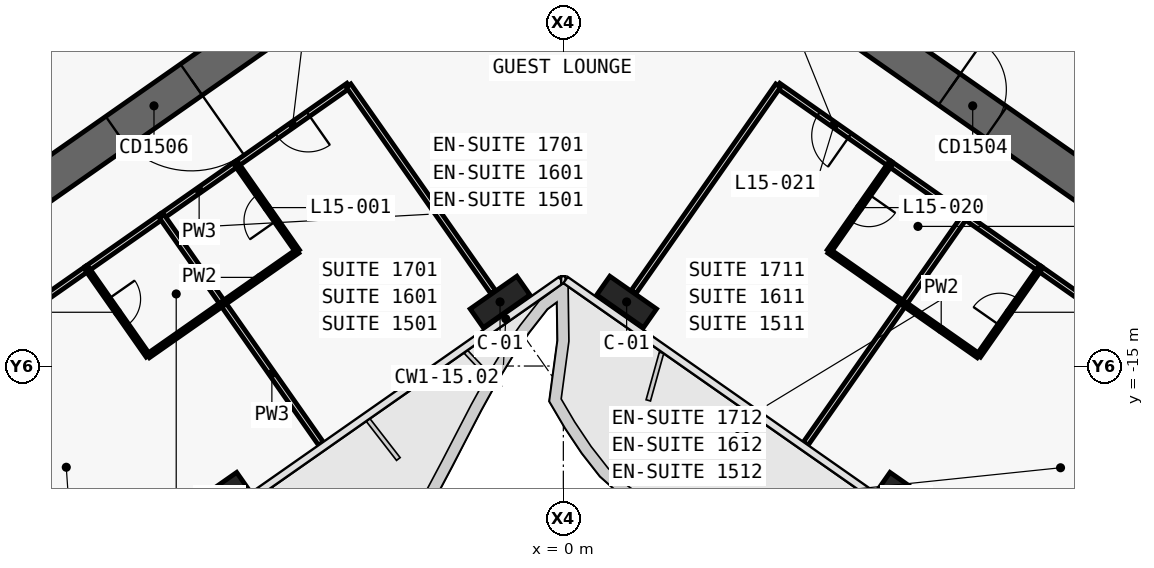
"""IFC4 building model, lengths in metres.
Left out: names, types, materials, properties, quantities, classifications, styles, units other than length and angle.
Written with IfcOpenShell. Run it as: python <this file> out.ifc"""

import sys

from ifc_helpers import new_model, si_unit, direction, frame, frame_2d, origin, origin_2d, place, context, subcontext, project, spatial, polyline, rectangle, outline, extrude, element, fill, save


model = new_model("IFC4")
c1 = context("Model", 3, precision=1e-05, world=origin(), true_north=direction((0.0, 1.0)))
c2 = subcontext(c1, "Body", "Model", "MODEL_VIEW")
j1 = project(units=[si_unit("LENGTHUNIT", "METRE"), si_unit("PLANEANGLEUNIT", "RADIAN")], contexts=[c1])
p1 = place(None, origin())
s1 = spatial("IfcSite", under=j1, at=p1, CompositionType="ELEMENT")
p2 = place(p1, origin())
s2 = spatial("IfcBuilding", under=s1, at=p2, CompositionType="ELEMENT")
p3 = place(p2, frame((0.0, 0.0, 79.7)))
s3 = spatial("IfcBuildingStorey", under=s2, at=p3, CompositionType="ELEMENT", Elevation=79.7)
p4 = place(p3, frame((0.037, 11.867, 0.0), z_axis=(0.0, 0.0, 1.0), x_axis=(-0.819155306259, -0.573571777746, 0.0)))
e1 = element("IfcWall", 1, at=p4, inside=s3, PredefinedType="SHEAR", context=c2, shape_type="SweptSolid", body=[
    extrude(outline(polyline([(33.837, 0.5), (0.7, 0.5), (0.0, -0.5), (33.837, -0.5), (33.837, 0.5)])), origin(), (0.0, 0.0, 1.0), 3.6),
])
p5 = place(p3, frame((0.037, -0.585, 0.0), z_axis=(0.0, 0.0, 1.0), x_axis=(-0.819157152511, -0.573569140985, 0.0)))
e2 = element("IfcWall", 2, at=p5, inside=s3, PredefinedType="SHEAR", context=c2, shape_type="SweptSolid", body=[
    extrude(outline(polyline([(26.695, 0.5), (0.7, 0.5), (0.0, -0.5), (26.695, -0.5), (26.695, 0.5)])), origin(), (0.0, 0.0, 1.0), 3.6),
])
p6 = place(p5, frame((2.995, 0.0, 0.0)))
e3 = element("IfcOpeningElement", 3, at=p6, cuts=e2, PredefinedType="OPENING", context=c2, shape_type="SweptSolid", body=[
    extrude(rectangle(XDim=2.4, YDim=2.1, at=frame_2d((1.2, 1.05))), frame((0.0, 0.51, 0.0), z_axis=(0.0, -1.0, 0.0), x_axis=(1.0, 0.0, 0.0)), (0.0, 0.0, 1.0), 1.02),
])
p7 = place(p5, frame((11.995, 0.0, 0.0)))
e4 = element("IfcOpeningElement", 4, at=p7, cuts=e2, PredefinedType="OPENING", context=c2, shape_type="SweptSolid", body=[
    extrude(rectangle(XDim=2.4, YDim=2.1, at=frame_2d((1.2, 1.05))), frame((0.0, 0.51, 0.0), z_axis=(0.0, -1.0, 0.0), x_axis=(1.0, 0.0, 0.0)), (0.0, 0.0, 1.0), 1.02),
])
p8 = place(p3, frame((-2.638, 3.768, 0.0), z_axis=(0.0, 0.0, 1.0), x_axis=(-0.819148977158, -0.573580816643, 0.0)))
e5 = element("IfcWall", 5, at=p8, inside=s3, PredefinedType="SHEAR", context=c2, shape_type="SweptSolid", body=[
    extrude(outline(polyline([(26.0, 0.25), (0.0, 0.25), (0.0, -0.25), (26.0, -0.25), (26.0, 0.25)])), origin(), (0.0, 0.0, 1.0), 3.6),
])
p9 = place(p8, frame((1.169, 0.0, 0.0)))
e6 = element("IfcOpeningElement", 6, at=p9, cuts=e5, PredefinedType="OPENING", context=c2, shape_type="SweptSolid", body=[
    extrude(rectangle(XDim=1.1, YDim=2.1, at=frame_2d((0.55, 1.05))), frame((0.0, 0.26, 0.0), z_axis=(0.0, -1.0, 0.0), x_axis=(1.0, 0.0, 0.0)), (0.0, 0.0, 1.0), 0.52),
])
p10 = place(p8, frame((3.206, 0.0, 0.0)))
e7 = element("IfcOpeningElement", 7, at=p10, cuts=e5, PredefinedType="OPENING", context=c2, shape_type="SweptSolid", body=[
    extrude(rectangle(XDim=1.1, YDim=2.1, at=frame_2d((0.55, 1.05))), frame((0.0, 0.26, 0.0), z_axis=(0.0, -1.0, 0.0), x_axis=(1.0, 0.0, 0.0)), (0.0, 0.0, 1.0), 0.52),
])
p11 = place(p8, frame((5.244, 0.0, 0.0)))
e8 = element("IfcOpeningElement", 8, at=p11, cuts=e5, PredefinedType="OPENING", context=c2, shape_type="SweptSolid", body=[
    extrude(rectangle(XDim=1.1, YDim=2.1, at=frame_2d((0.55, 1.05))), frame((0.0, 0.26, 0.0), z_axis=(0.0, -1.0, 0.0), x_axis=(1.0, 0.0, 0.0)), (0.0, 0.0, 1.0), 0.52),
])
p12 = place(p8, frame((7.281, 0.0, 0.0)))
e9 = element("IfcOpeningElement", 9, at=p12, cuts=e5, PredefinedType="OPENING", context=c2, shape_type="SweptSolid", body=[
    extrude(rectangle(XDim=1.1, YDim=2.1, at=frame_2d((0.55, 1.05))), frame((0.0, 0.26, 0.0), z_axis=(0.0, -1.0, 0.0), x_axis=(1.0, 0.0, 0.0)), (0.0, 0.0, 1.0), 0.52),
])
p13 = place(p8, frame((9.688, 0.0, 0.0)))
e10 = element("IfcOpeningElement", 10, at=p13, cuts=e5, PredefinedType="OPENING", context=c2, shape_type="SweptSolid", body=[
    extrude(rectangle(XDim=1.1, YDim=2.1, at=frame_2d((0.55, 1.05))), frame((0.0, 0.26, 0.0), z_axis=(0.0, -1.0, 0.0), x_axis=(1.0, 0.0, 0.0)), (0.0, 0.0, 1.0), 0.52),
])
p14 = place(p8, frame((11.863, 0.0, 0.0)))
e11 = element("IfcOpeningElement", 11, at=p14, cuts=e5, PredefinedType="OPENING", context=c2, shape_type="SweptSolid", body=[
    extrude(rectangle(XDim=1.1, YDim=2.1, at=frame_2d((0.55, 1.05))), frame((0.0, 0.26, 0.0), z_axis=(0.0, -1.0, 0.0), x_axis=(1.0, 0.0, 0.0)), (0.0, 0.0, 1.0), 0.52),
])
p15 = place(p8, frame((14.038, 0.0, 0.0)))
e12 = element("IfcOpeningElement", 12, at=p15, cuts=e5, PredefinedType="OPENING", context=c2, shape_type="SweptSolid", body=[
    extrude(rectangle(XDim=1.1, YDim=2.1, at=frame_2d((0.55, 1.05))), frame((0.0, 0.26, 0.0), z_axis=(0.0, -1.0, 0.0), x_axis=(1.0, 0.0, 0.0)), (0.0, 0.0, 1.0), 0.52),
])
p16 = place(p8, frame((16.212, 0.0, 0.0)))
e13 = element("IfcOpeningElement", 13, at=p16, cuts=e5, PredefinedType="OPENING", context=c2, shape_type="SweptSolid", body=[
    extrude(rectangle(XDim=1.1, YDim=2.1, at=frame_2d((0.55, 1.05))), frame((0.0, 0.26, 0.0), z_axis=(0.0, -1.0, 0.0), x_axis=(1.0, 0.0, 0.0)), (0.0, 0.0, 1.0), 0.52),
])
p17 = place(p3, frame((-0.037, 11.867, 0.0), z_axis=(0.0, 0.0, 1.0), x_axis=(0.819155306259, -0.573571777746, 0.0)))
e14 = element("IfcWall", 14, at=p17, inside=s3, PredefinedType="SHEAR", context=c2, shape_type="SweptSolid", body=[
    extrude(outline(polyline([(33.837, 0.5), (0.0, 0.5), (0.7, -0.5), (33.837, -0.5), (33.837, 0.5)])), origin(), (0.0, 0.0, 1.0), 3.6),
])
p18 = place(p3, frame((-0.037, -0.585, 0.0), z_axis=(0.0, 0.0, 1.0), x_axis=(0.819157152511, -0.573569140985, 0.0)))
e15 = element("IfcWall", 15, at=p18, inside=s3, PredefinedType="SHEAR", context=c2, shape_type="SweptSolid", body=[
    extrude(outline(polyline([(26.695, 0.5), (0.0, 0.5), (0.7, -0.5), (26.695, -0.5), (26.695, 0.5)])), origin(), (0.0, 0.0, 1.0), 3.6),
])
p19 = place(p18, frame((1.245, 0.0, 0.0)))
e16 = element("IfcOpeningElement", 16, at=p19, cuts=e15, PredefinedType="OPENING", context=c2, shape_type="SweptSolid", body=[
    extrude(rectangle(XDim=1.5, YDim=2.1, at=frame_2d((0.75, 1.05))), frame((0.0, 0.51, 0.0), z_axis=(0.0, -1.0, 0.0), x_axis=(1.0, 0.0, 0.0)), (0.0, 0.0, 1.0), 1.02),
])
p20 = place(p18, frame((12.445, 0.0, 0.0)))
e17 = element("IfcOpeningElement", 17, at=p20, cuts=e15, PredefinedType="OPENING", context=c2, shape_type="SweptSolid", body=[
    extrude(rectangle(XDim=1.5, YDim=2.1, at=frame_2d((0.75, 1.05))), frame((0.0, 0.51, 0.0), z_axis=(0.0, -1.0, 0.0), x_axis=(1.0, 0.0, 0.0)), (0.0, 0.0, 1.0), 1.02),
])
p21 = place(p3, frame((2.638, 3.768, 0.0), z_axis=(0.0, 0.0, 1.0), x_axis=(0.819148977158, -0.573580816643, 0.0)))
e18 = element("IfcWall", 18, at=p21, inside=s3, PredefinedType="SHEAR", context=c2, shape_type="SweptSolid", body=[
    extrude(outline(polyline([(0.0, 0.25), (0.0, -0.25), (26.0, -0.25), (26.0, 0.25), (0.0, 0.25)])), origin(), (0.0, 0.0, 1.0), 3.6),
])
p22 = place(p21, frame((9.637, 0.0, 0.0)))
e19 = element("IfcOpeningElement", 19, at=p22, cuts=e18, PredefinedType="OPENING", context=c2, shape_type="SweptSolid", body=[
    extrude(rectangle(XDim=1.2, YDim=2.1, at=frame_2d((0.6, 1.05))), frame((0.0, 0.26, 0.0), z_axis=(0.0, -1.0, 0.0), x_axis=(1.0, 0.0, 0.0)), (0.0, 0.0, 1.0), 0.52),
])
p23 = place(p21, frame((11.812, 0.0, 0.0)))
e20 = element("IfcOpeningElement", 20, at=p23, cuts=e18, PredefinedType="OPENING", context=c2, shape_type="SweptSolid", body=[
    extrude(rectangle(XDim=1.2, YDim=2.1, at=frame_2d((0.6, 1.05))), frame((0.0, 0.26, 0.0), z_axis=(0.0, -1.0, 0.0), x_axis=(1.0, 0.0, 0.0)), (0.0, 0.0, 1.0), 0.52),
])
p24 = place(p21, frame((13.988, 0.0, 0.0)))
e21 = element("IfcOpeningElement", 21, at=p24, cuts=e18, PredefinedType="OPENING", context=c2, shape_type="SweptSolid", body=[
    extrude(rectangle(XDim=1.2, YDim=2.1, at=frame_2d((0.6, 1.05))), frame((0.0, 0.26, 0.0), z_axis=(0.0, -1.0, 0.0), x_axis=(1.0, 0.0, 0.0)), (0.0, 0.0, 1.0), 0.52),
])
p25 = place(p21, frame((16.262, 0.0, 0.0)))
e22 = element("IfcOpeningElement", 22, at=p25, cuts=e18, PredefinedType="OPENING", context=c2, shape_type="SweptSolid", body=[
    extrude(rectangle(XDim=1.0, YDim=2.1, at=frame_2d((0.5, 1.05))), frame((0.0, 0.26, 0.0), z_axis=(0.0, -1.0, 0.0), x_axis=(1.0, 0.0, 0.0)), (0.0, 0.0, 1.0), 0.52),
])
for number, where, z_axis, x_axis in (
    (23, (-1.665, -13.313, 0.0), (0.0, 0.0, 1.0), (-0.819, -0.574, 0.0)),
    (24, (-9.038, -18.475, 0.0), (0.0, 0.0, 1.0), (-0.819, -0.574, 0.0)),
    (25, (1.665, -13.313, 0.0), (0.0, 0.0, 1.0), (0.819, -0.574, 0.0)),
    (26, (9.038, -18.475, 0.0), (0.0, 0.0, 1.0), (0.819, -0.574, 0.0)),
):
    element("IfcColumn", number, at=place(p3, frame(where, z_axis=z_axis, x_axis=x_axis)), inside=s3, PredefinedType="COLUMN", context=c2, shape_type="SweptSolid", body=[
        extrude(rectangle(XDim=1.5, YDim=0.6, at=origin_2d()), origin(), (0.0, 0.0, 1.0), 3.6),
    ])
p26 = place(p3, frame((8.601, -9.685, 0.0), z_axis=(0.0, 0.0, 1.0), x_axis=(-0.819149096931, 0.573580645591, 0.0)))
e27 = element("IfcWall", 27, at=p26, inside=s3, PredefinedType="PARTITIONING", context=c2, shape_type="SweptSolid", body=[
    extrude(rectangle(XDim=3.601, YDim=0.15, at=frame_2d((1.8, 0.0))), origin(), (0.0, 0.0, 1.0), 2.6),
])
p27 = place(p26, frame((1.301, 0.0, 0.0)))
e28 = element("IfcOpeningElement", 28, at=p27, cuts=e27, PredefinedType="OPENING", context=c2, shape_type="SweptSolid", body=[
    extrude(rectangle(XDim=1.0, YDim=2.1, at=frame_2d((0.5, 1.05))), frame((0.0, 0.085, 0.0), z_axis=(0.0, -1.0, 0.0), x_axis=(1.0, 0.0, 0.0)), (0.0, 0.0, 1.0), 0.17),
])
p28 = place(p3, frame((10.568, -11.062, 0.0), z_axis=(0.0, 0.0, 1.0), x_axis=(-0.819146032251, 0.573585022335, 0.0)))
e29 = element("IfcWall", 29, at=p28, inside=s3, PredefinedType="PARTITIONING", context=c2, shape_type="SweptSolid", body=[
    extrude(rectangle(XDim=2.404, YDim=0.15, at=frame_2d((1.202, 0.0))), origin(), (0.0, 0.0, 1.0), 3.32),
])
p29 = place(p3, frame((17.941, -16.224, 0.0), z_axis=(0.0, 0.0, 1.0), x_axis=(-0.819153746897, 0.573574004767, 0.0)))
e30 = element("IfcWall", 30, at=p29, inside=s3, PredefinedType="PARTITIONING", context=c2, shape_type="SweptSolid", body=[
    extrude(rectangle(XDim=6.603, YDim=0.15, at=frame_2d((3.302, 0.0))), origin(), (0.0, 0.0, 1.0), 2.6),
])
p30 = place(p29, frame((2.802, 0.0, 0.0)))
e31 = element("IfcOpeningElement", 31, at=p30, cuts=e30, PredefinedType="OPENING", context=c2, shape_type="SweptSolid", body=[
    extrude(rectangle(XDim=1.0, YDim=2.1, at=frame_2d((0.5, 1.05))), frame((0.0, 0.085, 0.0), z_axis=(0.0, -1.0, 0.0), x_axis=(1.0, 0.0, 0.0)), (0.0, 0.0, 1.0), 0.17),
])
p31 = place(p3, frame((12.534, -12.439, 0.0), z_axis=(0.0, 0.0, 1.0), x_axis=(-0.819193748, 0.57351687267, 0.0)))
e32 = element("IfcWall", 32, at=p31, inside=s3, PredefinedType="PARTITIONING", context=c2, shape_type="SweptSolid", body=[
    extrude(rectangle(XDim=2.404, YDim=0.15, at=frame_2d((1.202, 0.0))), origin(), (0.0, 0.0, 1.0), 3.32),
])
p32 = place(p3, frame((-5.652, -7.62, 0.0), z_axis=(0.0, 0.0, 1.0), x_axis=(-0.819149096931, -0.573580645591, 0.0)))
e33 = element("IfcWall", 33, at=p32, inside=s3, PredefinedType="PARTITIONING", context=c2, shape_type="SweptSolid", body=[
    extrude(rectangle(XDim=3.601, YDim=0.15, at=frame_2d((1.8, 0.0))), origin(), (0.0, 0.0, 1.0), 2.6),
])
p33 = place(p32, frame((1.3, 0.0, 0.0)))
e34 = element("IfcOpeningElement", 34, at=p33, cuts=e33, PredefinedType="OPENING", context=c2, shape_type="SweptSolid", body=[
    extrude(rectangle(XDim=1.0, YDim=2.1, at=frame_2d((0.5, 1.05))), frame((0.0, 0.085, 0.0), z_axis=(0.0, -1.0, 0.0), x_axis=(1.0, 0.0, 0.0)), (0.0, 0.0, 1.0), 0.17),
])
p34 = place(p3, frame((-8.599, -9.683, 0.0), z_axis=(0.0, 0.0, 1.0), x_axis=(-0.819146032251, -0.573585022335, 0.0)))
e35 = element("IfcWall", 35, at=p34, inside=s3, PredefinedType="PARTITIONING", context=c2, shape_type="SweptSolid", body=[
    extrude(rectangle(XDim=2.404, YDim=0.15, at=frame_2d((1.202, 0.0))), origin(), (0.0, 0.0, 1.0), 3.32),
])
p35 = place(p3, frame((-12.532, -12.437, 0.0), z_axis=(0.0, 0.0, 1.0), x_axis=(-0.819153746897, -0.573574004767, 0.0)))
e36 = element("IfcWall", 36, at=p35, inside=s3, PredefinedType="PARTITIONING", context=c2, shape_type="SweptSolid", body=[
    extrude(rectangle(XDim=6.603, YDim=0.15, at=frame_2d((3.302, 0.0))), origin(), (0.0, 0.0, 1.0), 2.6),
])
p36 = place(p35, frame((2.801, 0.0, 0.0)))
e37 = element("IfcOpeningElement", 37, at=p36, cuts=e36, PredefinedType="OPENING", context=c2, shape_type="SweptSolid", body=[
    extrude(rectangle(XDim=1.0, YDim=2.1, at=frame_2d((0.5, 1.05))), frame((0.0, 0.085, 0.0), z_axis=(0.0, -1.0, 0.0), x_axis=(1.0, 0.0, 0.0)), (0.0, 0.0, 1.0), 0.17),
])
p37 = place(p3, frame((-10.565, -11.06, 0.0), z_axis=(0.0, 0.0, 1.0), x_axis=(-0.819193748, -0.57351687267, 0.0)))
e38 = element("IfcWall", 38, at=p37, inside=s3, PredefinedType="PARTITIONING", context=c2, shape_type="SweptSolid", body=[
    extrude(rectangle(XDim=2.404, YDim=0.15, at=frame_2d((1.202, 0.0))), origin(), (0.0, 0.0, 1.0), 3.32),
])
p38 = place(p3, frame((8.6, -9.684, 0.0), z_axis=(0.0, 0.0, 1.0), x_axis=(-0.573550118428, -0.819170471667, 0.0)))
e39 = element("IfcWall", 39, at=p38, inside=s3, PredefinedType="PARTITIONING", context=c2, shape_type="SweptSolid", body=[
    extrude(rectangle(XDim=2.8, YDim=0.12, at=frame_2d((1.4, 0.0))), origin(), (0.0, 0.0, 1.0), 3.32),
])
p39 = place(p38, frame((0.975, 0.0, 0.0)))
e40 = element("IfcOpeningElement", 40, at=p39, cuts=e39, PredefinedType="OPENING", context=c2, shape_type="SweptSolid", body=[
    extrude(rectangle(XDim=0.85, YDim=2.05, at=frame_2d((0.425, 1.025))), frame((0.0, 0.07, 0.0), z_axis=(0.0, -1.0, 0.0), x_axis=(1.0, 0.0, 0.0)), (0.0, 0.0, 1.0), 0.14),
])
p40 = place(p3, frame((6.994, -11.979, 0.0), z_axis=(0.0, 0.0, 1.0), x_axis=(0.819188907105, -0.573523787192, 0.0)))
e41 = element("IfcWall", 41, at=p40, inside=s3, PredefinedType="PARTITIONING", context=c2, shape_type="SweptSolid", body=[
    extrude(rectangle(XDim=2.4, YDim=0.12, at=frame_2d((1.2, 0.0))), origin(), (0.0, 0.0, 1.0), 3.32),
])
p41 = place(p3, frame((8.96, -13.355, 0.0), z_axis=(0.0, 0.0, 1.0), x_axis=(-0.573564311442, -0.819160534108, 0.0)))
e42 = element("IfcWall", 42, at=p41, inside=s3, PredefinedType="PARTITIONING", context=c2, shape_type="SweptSolid", body=[
    extrude(rectangle(XDim=4.499, YDim=0.15, at=frame_2d((2.25, 0.0))), origin(), (0.0, 0.0, 1.0), 2.5),
])
p42 = place(p3, frame((1.849, -13.051, 0.0), z_axis=(0.0, 0.0, 1.0), x_axis=(0.57357355307, 0.819154063177, 0.0)))
e43 = element("IfcWall", 43, at=p42, inside=s3, PredefinedType="PARTITIONING", context=c2, shape_type="SweptSolid", body=[
    extrude(rectangle(XDim=6.63, YDim=0.15, at=frame_2d((3.315, 0.0))), origin(), (0.0, 0.0, 1.0), 2.6),
])
p43 = place(p3, frame((10.567, -11.061, 0.0), z_axis=(0.0, 0.0, 1.0), x_axis=(-0.573608623498, -0.819129505664, 0.0)))
e44 = element("IfcWall", 44, at=p43, inside=s3, PredefinedType="PARTITIONING", context=c2, shape_type="SweptSolid", body=[
    extrude(rectangle(XDim=2.8, YDim=0.15, at=frame_2d((1.4, 0.0))), origin(), (0.0, 0.0, 1.0), 3.32),
])
p44 = place(p3, frame((8.96, -13.355, 0.0), z_axis=(0.0, 0.0, 1.0), x_axis=(0.819107643868, -0.573639841501, 0.0)))
e45 = element("IfcWall", 45, at=p44, inside=s3, PredefinedType="PARTITIONING", context=c2, shape_type="SweptSolid", body=[
    extrude(rectangle(XDim=2.4, YDim=0.12, at=frame_2d((1.2, 0.0))), origin(), (0.0, 0.0, 1.0), 3.32),
])
p45 = place(p3, frame((10.927, -14.732, 0.0), z_axis=(0.0, 0.0, 1.0), x_axis=(0.573550118428, 0.819170471667, 0.0)))
e46 = element("IfcWall", 46, at=p45, inside=s3, PredefinedType="PARTITIONING", context=c2, shape_type="SweptSolid", body=[
    extrude(rectangle(XDim=2.8, YDim=0.12, at=frame_2d((1.4, 0.0))), origin(), (0.0, 0.0, 1.0), 3.32),
])
p46 = place(p45, frame((0.975, 0.0, 0.0)))
e47 = element("IfcOpeningElement", 47, at=p46, cuts=e46, PredefinedType="OPENING", context=c2, shape_type="SweptSolid", body=[
    extrude(rectangle(XDim=0.85, YDim=2.05, at=frame_2d((0.425, 1.025))), frame((0.0, 0.07, 0.0), z_axis=(0.0, -1.0, 0.0), x_axis=(1.0, 0.0, 0.0)), (0.0, 0.0, 1.0), 0.14),
])
p47 = place(p3, frame((-1.849, -13.051, 0.0), z_axis=(0.0, 0.0, 1.0), x_axis=(-0.573575988258, 0.819152358047, 0.0)))
e48 = element("IfcWall", 48, at=p47, inside=s3, PredefinedType="PARTITIONING", context=c2, shape_type="SweptSolid", body=[
    extrude(rectangle(XDim=6.632, YDim=0.15, at=frame_2d((3.316, 0.0))), origin(), (0.0, 0.0, 1.0), 2.6),
])
p48 = place(p3, frame((-8.96, -13.355, 0.0), z_axis=(0.0, 0.0, 1.0), x_axis=(0.819188907105, 0.573523787192, 0.0)))
e49 = element("IfcWall", 49, at=p48, inside=s3, PredefinedType="PARTITIONING", context=c2, shape_type="SweptSolid", body=[
    extrude(rectangle(XDim=2.4, YDim=0.12, at=frame_2d((1.2, 0.0))), origin(), (0.0, 0.0, 1.0), 3.32),
])
p49 = place(p3, frame((-6.994, -11.978, 0.0), z_axis=(0.0, 0.0, 1.0), x_axis=(-0.573550118428, 0.819170471667, 0.0)))
e50 = element("IfcWall", 50, at=p49, inside=s3, PredefinedType="PARTITIONING", context=c2, shape_type="SweptSolid", body=[
    extrude(rectangle(XDim=2.8, YDim=0.12, at=frame_2d((1.4, 0.0))), origin(), (0.0, 0.0, 1.0), 3.32),
])
p50 = place(p49, frame((0.975, 0.0, 0.0)))
e51 = element("IfcOpeningElement", 51, at=p50, cuts=e50, PredefinedType="OPENING", context=c2, shape_type="SweptSolid", body=[
    extrude(rectangle(XDim=0.85, YDim=2.05, at=frame_2d((0.425, 1.025))), frame((0.0, 0.07, 0.0), z_axis=(0.0, -1.0, 0.0), x_axis=(1.0, 0.0, 0.0)), (0.0, 0.0, 1.0), 0.14),
])
p51 = place(p3, frame((-6.379, -17.041, 0.0), z_axis=(0.0, 0.0, 1.0), x_axis=(-0.573564311442, 0.819160534108, 0.0)))
e52 = element("IfcWall", 52, at=p51, inside=s3, PredefinedType="PARTITIONING", context=c2, shape_type="SweptSolid", body=[
    extrude(rectangle(XDim=4.499, YDim=0.15, at=frame_2d((2.25, 0.0))), origin(), (0.0, 0.0, 1.0), 2.5),
])
p52 = place(p3, frame((-8.96, -13.355, 0.0), z_axis=(0.0, 0.0, 1.0), x_axis=(-0.573608623498, 0.819129505664, 0.0)))
e53 = element("IfcWall", 53, at=p52, inside=s3, PredefinedType="PARTITIONING", context=c2, shape_type="SweptSolid", body=[
    extrude(rectangle(XDim=2.8, YDim=0.15, at=frame_2d((1.4, 0.0))), origin(), (0.0, 0.0, 1.0), 3.32),
])
p53 = place(p3, frame((-12.533, -12.438, 0.0), z_axis=(0.0, 0.0, 1.0), x_axis=(0.573550118428, -0.819170471667, 0.0)))
e54 = element("IfcWall", 54, at=p53, inside=s3, PredefinedType="PARTITIONING", context=c2, shape_type="SweptSolid", body=[
    extrude(rectangle(XDim=2.8, YDim=0.12, at=frame_2d((1.4, 0.0))), origin(), (0.0, 0.0, 1.0), 3.32),
])
p54 = place(p53, frame((0.975, 0.0, 0.0)))
e55 = element("IfcOpeningElement", 55, at=p54, cuts=e54, PredefinedType="OPENING", context=c2, shape_type="SweptSolid", body=[
    extrude(rectangle(XDim=0.85, YDim=2.05, at=frame_2d((0.425, 1.025))), frame((0.0, 0.07, 0.0), z_axis=(0.0, -1.0, 0.0), x_axis=(1.0, 0.0, 0.0)), (0.0, 0.0, 1.0), 0.14),
])
p55 = place(p3, frame((-10.926, -14.732, 0.0), z_axis=(0.0, 0.0, 1.0), x_axis=(0.819107643868, 0.573639841501, 0.0)))
e56 = element("IfcWall", 56, at=p55, inside=s3, PredefinedType="PARTITIONING", context=c2, shape_type="SweptSolid", body=[
    extrude(rectangle(XDim=2.4, YDim=0.12, at=frame_2d((1.2, 0.0))), origin(), (0.0, 0.0, 1.0), 3.32),
])
p56 = place(p7, origin())
e57 = element("IfcDoor", 57, at=p56, inside=s3, OperationType="DOUBLE_DOOR_SINGLE_SWING", PredefinedType="DOOR", context=c2, shape_type="SweptSolid", body=[
    extrude(rectangle(XDim=2.4, YDim=2.1, at=frame_2d((1.2, 1.05))), frame((0.0, 0.025, 0.0), z_axis=(0.0, -1.0, 0.0), x_axis=(1.0, 0.0, 0.0)), (0.0, 0.0, 1.0), 0.05),
])
fill(e4, e57)
p57 = place(p20, origin())
e58 = element("IfcDoor", 58, at=p57, inside=s3, OperationType="DOUBLE_DOOR_SINGLE_SWING", PredefinedType="DOOR", context=c2, shape_type="SweptSolid", body=[
    extrude(rectangle(XDim=1.5, YDim=2.1, at=frame_2d((0.75, 1.05))), frame((0.0, 0.025, 0.0), z_axis=(0.0, -1.0, 0.0), x_axis=(1.0, 0.0, 0.0)), (0.0, 0.0, 1.0), 0.05),
])
fill(e17, e58)
p58 = place(p50, origin())
e59 = element("IfcDoor", 59, at=p58, inside=s3, OperationType="SINGLE_SWING_LEFT", PredefinedType="DOOR", context=c2, shape_type="SweptSolid", body=[
    extrude(rectangle(XDim=0.85, YDim=2.05, at=frame_2d((0.425, 1.025))), frame((0.0, 0.025, 0.0), z_axis=(0.0, -1.0, 0.0), x_axis=(1.0, 0.0, 0.0)), (0.0, 0.0, 1.0), 0.05),
])
fill(e51, e59)
p59 = place(p33, origin())
e60 = element("IfcDoor", 60, at=p59, inside=s3, OperationType="SINGLE_SWING_RIGHT", PredefinedType="DOOR", context=c2, shape_type="SweptSolid", body=[
    extrude(rectangle(XDim=1.0, YDim=2.1, at=frame_2d((0.5, 1.05))), frame((0.0, 0.025, 0.0), z_axis=(0.0, -1.0, 0.0), x_axis=(1.0, 0.0, 0.0)), (0.0, 0.0, 1.0), 0.05),
])
fill(e34, e60)
p60 = place(p54, origin())
e61 = element("IfcDoor", 61, at=p60, inside=s3, OperationType="SINGLE_SWING_LEFT", PredefinedType="DOOR", context=c2, shape_type="SweptSolid", body=[
    extrude(rectangle(XDim=0.85, YDim=2.05, at=frame_2d((0.425, 1.025))), frame((0.0, 0.025, 0.0), z_axis=(0.0, -1.0, 0.0), x_axis=(1.0, 0.0, 0.0)), (0.0, 0.0, 1.0), 0.05),
])
fill(e55, e61)
p61 = place(p39, origin())
e62 = element("IfcDoor", 62, at=p61, inside=s3, OperationType="SINGLE_SWING_RIGHT", PredefinedType="DOOR", context=c2, shape_type="SweptSolid", body=[
    extrude(rectangle(XDim=0.85, YDim=2.05, at=frame_2d((0.425, 1.025))), frame((0.0, 0.025, 0.0), z_axis=(0.0, -1.0, 0.0), x_axis=(1.0, 0.0, 0.0)), (0.0, 0.0, 1.0), 0.05),
])
fill(e40, e62)
p62 = place(p27, origin())
e63 = element("IfcDoor", 63, at=p62, inside=s3, OperationType="SINGLE_SWING_LEFT", PredefinedType="DOOR", context=c2, shape_type="SweptSolid", body=[
    extrude(rectangle(XDim=1.0, YDim=2.1, at=frame_2d((0.5, 1.05))), frame((0.0, 0.025, 0.0), z_axis=(0.0, -1.0, 0.0), x_axis=(1.0, 0.0, 0.0)), (0.0, 0.0, 1.0), 0.05),
])
fill(e28, e63)
p63 = place(p46, origin())
e64 = element("IfcDoor", 64, at=p63, inside=s3, OperationType="SINGLE_SWING_RIGHT", PredefinedType="DOOR", context=c2, shape_type="SweptSolid", body=[
    extrude(rectangle(XDim=0.85, YDim=2.05, at=frame_2d((0.425, 1.025))), frame((0.0, 0.025, 0.0), z_axis=(0.0, -1.0, 0.0), x_axis=(1.0, 0.0, 0.0)), (0.0, 0.0, 1.0), 0.05),
])
fill(e47, e64)
save(model, sys.argv[1])
